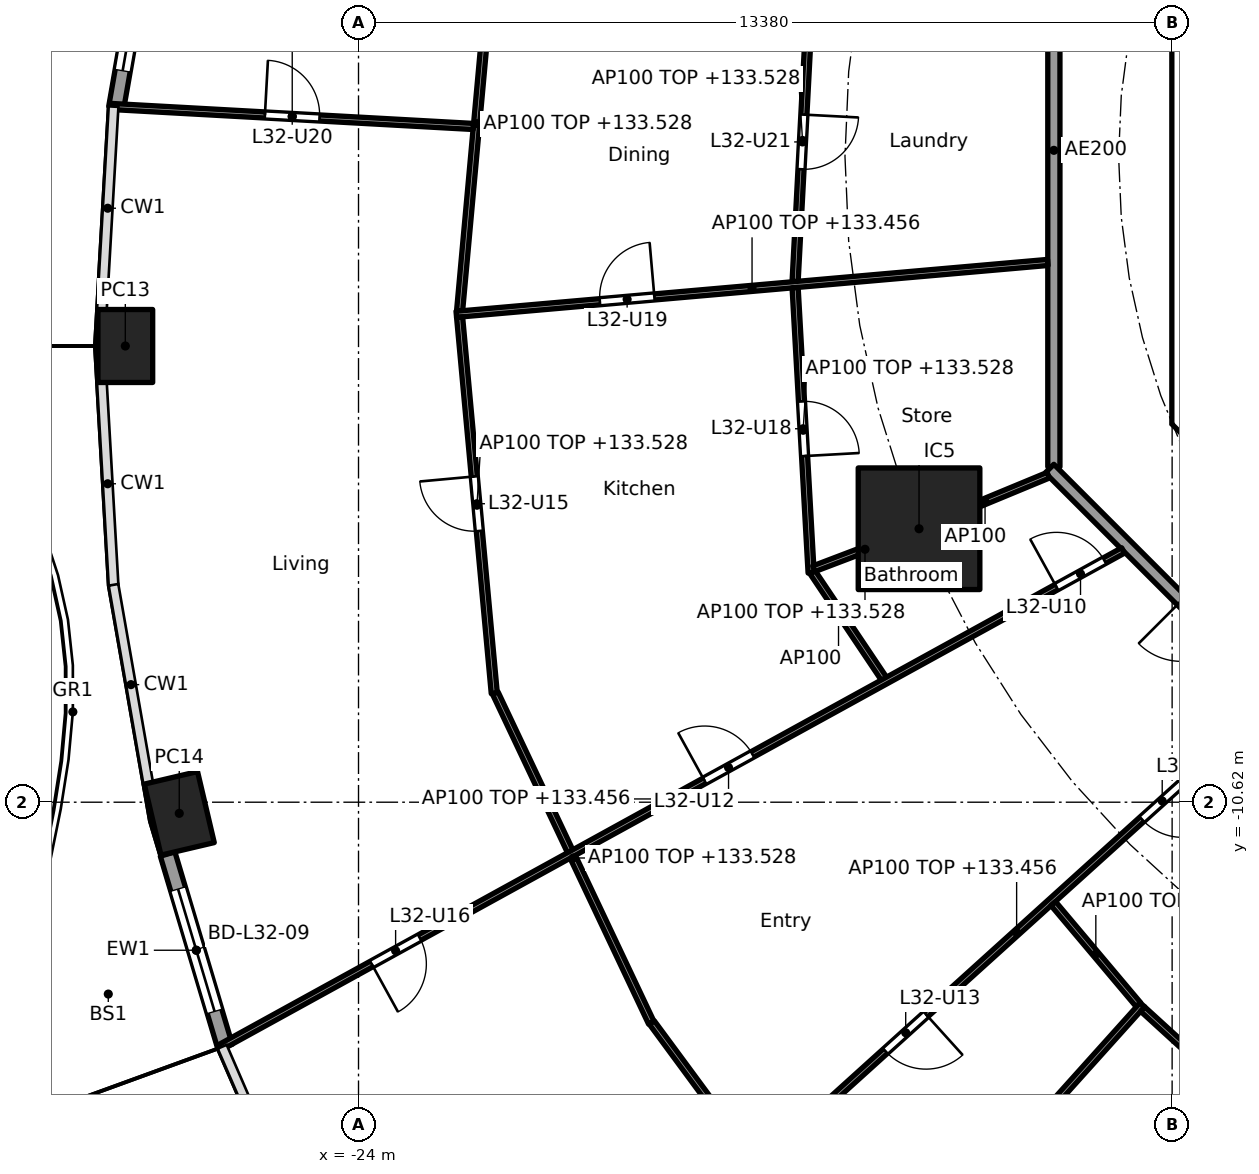
"""IFC4 building model, lengths in metres.
Left out: names, types, materials, properties, quantities, classifications, styles, units other than length and angle.
Written with IfcOpenShell. Run it as: python <this file> out.ifc"""

import sys

from ifc_helpers import new_model, si_unit, direction, frame, frame_2d, origin, origin_2d, place, context, subcontext, project, spatial, polyline, rectangle, hollow_rectangle, outline, extrude, element, fill, save


model = new_model("IFC4")
c1 = context("Model", 3, precision=1e-05, world=origin(), true_north=direction((0.0, 1.0)))
c2 = subcontext(c1, "Body", "Model", "MODEL_VIEW")
j1 = project(units=[si_unit("LENGTHUNIT", "METRE"), si_unit("PLANEANGLEUNIT", "RADIAN")], contexts=[c1])
p1 = place(None, origin())
s1 = spatial("IfcSite", under=j1, at=p1, CompositionType="ELEMENT")
p2 = place(p1, origin())
s2 = spatial("IfcBuilding", under=s1, at=p2, CompositionType="ELEMENT")
p3 = place(p2, frame((0.0, 0.0, 130.7)))
s3 = spatial("IfcBuildingStorey", under=s2, at=p3, CompositionType="ELEMENT", Elevation=130.7)
for number, where, z_axis, x_axis in (
    (1, (-27.835, -3.118, 0.0), (0.0, 0.0, 1.0), (0.0, -1.0, 0.0)),
    (2, (-26.948, -10.803, 0.0), (0.0, 0.0, 1.0), (0.229, -0.973, 0.0)),
):
    element("IfcColumn", number, at=place(p3, frame(where, z_axis=z_axis, x_axis=x_axis)), inside=s3, PredefinedType="COLUMN", context=c2, shape_type="SweptSolid", body=[
        extrude(hollow_rectangle(XDim=1.2, YDim=0.9, WallThickness=0.04, at=origin_2d()), origin(), (0.0, 0.0, 1.0), 3.7),
    ])
p4 = place(p3, frame((-14.782, -6.123, 0.0), z_axis=(0.0, 0.0, 1.0), x_axis=(1.0, 0.0, 0.0)))
e3 = element("IfcColumn", 3, at=p4, inside=s3, PredefinedType="COLUMN", context=c2, shape_type="SweptSolid", body=[
    extrude(rectangle(XDim=2.0, YDim=2.0, at=origin_2d()), origin(), (0.0, 0.0, 1.0), 3.7),
])
p5 = place(p3, frame((-27.985, 0.802, 0.0), z_axis=(0.0, 0.0, 1.0), x_axis=(0.172163521006, 0.985068384446, 0.0)))
e4 = element("IfcWall", 4, at=p5, inside=s3, PredefinedType="SOLIDWALL", context=c2, shape_type="SweptSolid", body=[
    extrude(rectangle(XDim=3.333, YDim=0.25, at=frame_2d((1.666, 0.0))), origin(), (0.0, 0.0, 1.0), 3.44),
])
p6 = place(p5, frame((0.616, 0.0, 0.0)))
e5 = element("IfcOpeningElement", 5, at=p6, cuts=e4, PredefinedType="OPENING", context=c2, shape_type="SweptSolid", body=[
    extrude(rectangle(XDim=2.1, YDim=2.4, at=frame_2d((1.05, 1.2))), frame((0.0, 0.135, 0.0), z_axis=(0.0, -1.0, 0.0), x_axis=(1.0, 0.0, 0.0)), (0.0, 0.0, 1.0), 0.27),
])
p7 = place(p3, frame((-26.195, -14.637, 0.0), z_axis=(0.0, 0.0, 1.0), x_axis=(-0.285889665412, 0.958262541901, 0.0)))
e6 = element("IfcWall", 6, at=p7, inside=s3, PredefinedType="SOLIDWALL", context=c2, shape_type="SweptSolid", body=[
    extrude(rectangle(XDim=3.303, YDim=0.25, at=frame_2d((1.652, 0.0))), origin(), (0.0, 0.0, 1.0), 3.44),
])
p8 = place(p7, frame((0.602, 0.0, 0.0)))
e7 = element("IfcOpeningElement", 7, at=p8, cuts=e6, PredefinedType="OPENING", context=c2, shape_type="SweptSolid", body=[
    extrude(rectangle(XDim=2.1, YDim=2.4, at=frame_2d((1.05, 1.2))), frame((0.0, 0.135, 0.0), z_axis=(0.0, -1.0, 0.0), x_axis=(1.0, 0.0, 0.0)), (0.0, 0.0, 1.0), 0.27),
])
p9 = place(p3, frame((-10.325, 3.801, 0.0), z_axis=(0.0, 0.0, 1.0), x_axis=(0.0, -1.0, 0.0)))
e8 = element("IfcWall", 8, at=p9, inside=s3, PredefinedType="SHEAR", context=c2, shape_type="SweptSolid", body=[
    extrude(rectangle(XDim=7.602, YDim=0.6, at=frame_2d((3.801, 0.0))), origin(), (0.0, 0.0, 1.0), 3.44),
])
p10 = place(p9, frame((0.651, 0.0, 0.0)))
e9 = element("IfcOpeningElement", 9, at=p10, cuts=e8, PredefinedType="OPENING", context=c2, shape_type="SweptSolid", body=[
    extrude(rectangle(XDim=1.5, YDim=2.1, at=frame_2d((0.75, 1.05))), frame((0.0, 0.31, 0.0), z_axis=(0.0, -1.0, 0.0), x_axis=(1.0, 0.0, 0.0)), (0.0, 0.0, 1.0), 0.62),
])
p11 = place(p9, frame((5.451, 0.0, 0.0)))
e10 = element("IfcOpeningElement", 10, at=p11, cuts=e8, PredefinedType="OPENING", context=c2, shape_type="SweptSolid", body=[
    extrude(rectangle(XDim=1.5, YDim=2.1, at=frame_2d((0.75, 1.05))), frame((0.0, 0.31, 0.0), z_axis=(0.0, -1.0, 0.0), x_axis=(1.0, 0.0, 0.0)), (0.0, 0.0, 1.0), 0.62),
])
p12 = place(p3, origin())
e11 = element("IfcWall", 11, at=p12, inside=s3, PredefinedType="SHEAR", context=c2, shape_type="SweptSolid", body=[
    extrude(outline(polyline([(-10.625, -3.801), (-10.025, -3.801), (-10.025, -4.152), (-9.776, -4.401), (-10.2, -4.825), (-10.625, -4.401), (-10.625, -3.801)])), origin(), (0.0, 0.0, 1.0), 3.44),
])
p13 = place(p3, frame((-6.149, -14.825, 0.0), z_axis=(0.0, 0.0, 1.0), x_axis=(-0.525406383516, -0.85085141603, 0.0)))
e12 = element("IfcWall", 12, at=p13, inside=s3, PredefinedType="PARTITIONING", context=c2, shape_type="SweptSolid", body=[
    extrude(rectangle(XDim=15.925, YDim=0.2, at=frame_2d((7.962, 0.0))), origin(), (0.0, 0.0, 1.0), 2.828),
])
p14 = place(p3, frame((-12.565, 5.304, 0.0), z_axis=(0.0, 0.0, 1.0), x_axis=(0.0, -1.0, 0.0)))
e13 = element("IfcWall", 13, at=p14, inside=s3, PredefinedType="PARTITIONING", context=c2, shape_type="SweptSolid", body=[
    extrude(rectangle(XDim=10.409, YDim=0.2, at=frame_2d((5.205, 0.0))), origin(), (0.0, 0.0, 1.0), 3.44),
])
p15 = place(p3, frame((-12.635, -5.134, 0.0), z_axis=(0.0, 0.0, 1.0), x_axis=(0.707106781187, -0.707106781187, 0.0)))
e14 = element("IfcWall", 14, at=p15, inside=s3, PredefinedType="PARTITIONING", context=c2, shape_type="SweptSolid", body=[
    extrude(rectangle(XDim=10.609, YDim=0.2, at=frame_2d((5.305, 0.0))), origin(), (0.0, 0.0, 1.0), 3.44),
])
p16 = place(p15, frame((3.07, 0.0, 0.0)))
e15 = element("IfcOpeningElement", 15, at=p16, cuts=e14, PredefinedType="OPENING", context=c2, shape_type="SweptSolid", body=[
    extrude(rectangle(XDim=1.0, YDim=2.1, at=frame_2d((0.5, 1.05))), frame((0.0, 0.11, 0.0), z_axis=(0.0, -1.0, 0.0), x_axis=(1.0, 0.0, 0.0)), (0.0, 0.0, 1.0), 0.22),
])
p17 = place(p3, frame((-16.576, 2.585, 0.0), z_axis=(0.0, 0.0, 1.0), x_axis=(-0.052509224895, -0.998620439056, 0.0)))
e16 = element("IfcWall", 16, at=p17, inside=s3, PredefinedType="PARTITIONING", context=c2, shape_type="SweptSolid", body=[
    extrude(rectangle(XDim=4.649, YDim=0.1, at=frame_2d((2.325, 0.0))), origin(), (0.0, 0.0, 1.0), 2.828),
])
p18 = place(p17, frame((1.9, 0.0, 0.0)))
e17 = element("IfcOpeningElement", 17, at=p18, cuts=e16, PredefinedType="OPENING", context=c2, shape_type="SweptSolid", body=[
    extrude(rectangle(XDim=0.9, YDim=2.1, at=frame_2d((0.45, 1.05))), frame((0.0, 0.06, 0.0), z_axis=(0.0, -1.0, 0.0), x_axis=(1.0, 0.0, 0.0)), (0.0, 0.0, 1.0), 0.12),
])
p19 = place(p3, frame((-21.777, 3.621, 0.0), z_axis=(0.0, 0.0, 1.0), x_axis=(-0.090606877484, -0.995886737412, 0.0)))
e18 = element("IfcWall", 18, at=p19, inside=s3, PredefinedType="PARTITIONING", context=c2, shape_type="SweptSolid", body=[
    extrude(rectangle(XDim=6.189, YDim=0.1, at=frame_2d((3.095, 0.0))), origin(), (0.0, 0.0, 1.0), 2.828),
])
p20 = place(p3, frame((-22.112, 0.492, 0.0), z_axis=(0.0, 0.0, 1.0), x_axis=(-0.998479185151, 0.055129999278, 0.0)))
e19 = element("IfcWall", 19, at=p20, inside=s3, PredefinedType="PARTITIONING", context=c2, shape_type="SweptSolid", body=[
    extrude(rectangle(XDim=5.965, YDim=0.1, at=frame_2d((2.982, 0.0))), origin(), (0.0, 0.0, 1.0), 2.905),
])
p21 = place(p20, frame((2.533, 0.0, 0.0)))
e20 = element("IfcOpeningElement", 20, at=p21, cuts=e19, PredefinedType="OPENING", context=c2, shape_type="SweptSolid", body=[
    extrude(rectangle(XDim=0.9, YDim=2.1, at=frame_2d((0.45, 1.05))), frame((0.0, 0.06, 0.0), z_axis=(0.0, -1.0, 0.0), x_axis=(1.0, 0.0, 0.0)), (0.0, 0.0, 1.0), 0.12),
])
p22 = place(p3, frame((-12.664, -1.744, 0.0), z_axis=(0.0, 0.0, 1.0), x_axis=(-0.99617728169, -0.087354584571, 0.0)))
e21 = element("IfcWall", 21, at=p22, inside=s3, PredefinedType="PARTITIONING", context=c2, shape_type="SweptSolid", body=[
    extrude(rectangle(XDim=9.765, YDim=0.1, at=frame_2d((4.883, 0.0))), origin(), (0.0, 0.0, 1.0), 2.756),
])
p23 = place(p22, frame((6.495, 0.0, 0.0)))
e22 = element("IfcOpeningElement", 22, at=p23, cuts=e21, PredefinedType="OPENING", context=c2, shape_type="SweptSolid", body=[
    extrude(rectangle(XDim=0.9, YDim=2.1, at=frame_2d((0.45, 1.05))), frame((0.0, 0.06, 0.0), z_axis=(0.0, -1.0, 0.0), x_axis=(1.0, 0.0, 0.0)), (0.0, 0.0, 1.0), 0.12),
])
p24 = place(p3, frame((-16.82, -2.158, 0.0), z_axis=(0.0, 0.0, 1.0), x_axis=(0.055967931845, -0.998432566879, 0.0)))
e23 = element("IfcWall", 23, at=p24, inside=s3, PredefinedType="PARTITIONING", context=c2, shape_type="SweptSolid", body=[
    extrude(rectangle(XDim=4.698, YDim=0.1, at=frame_2d((2.349, 0.0))), origin(), (0.0, 0.0, 1.0), 2.828),
])
p25 = place(p24, frame((1.874, 0.0, 0.0)))
e24 = element("IfcOpeningElement", 24, at=p25, cuts=e23, PredefinedType="OPENING", context=c2, shape_type="SweptSolid", body=[
    extrude(rectangle(XDim=0.9, YDim=2.1, at=frame_2d((0.45, 1.05))), frame((0.0, 0.06, 0.0), z_axis=(0.0, -1.0, 0.0), x_axis=(1.0, 0.0, 0.0)), (0.0, 0.0, 1.0), 0.12),
])
p26 = place(p3, frame((-22.338, -2.642, 0.0), z_axis=(0.0, 0.0, 1.0), x_axis=(0.091768304523, -0.995780386574, 0.0)))
e25 = element("IfcWall", 25, at=p26, inside=s3, PredefinedType="PARTITIONING", context=c2, shape_type="SweptSolid", body=[
    extrude(rectangle(XDim=6.215, YDim=0.1, at=frame_2d((3.107, 0.0))), origin(), (0.0, 0.0, 1.0), 2.828),
])
p27 = place(p26, frame((2.632, 0.0, 0.0)))
e26 = element("IfcOpeningElement", 26, at=p27, cuts=e25, PredefinedType="OPENING", context=c2, shape_type="SweptSolid", body=[
    extrude(rectangle(XDim=0.9, YDim=2.1, at=frame_2d((0.45, 1.05))), frame((0.0, 0.06, 0.0), z_axis=(0.0, -1.0, 0.0), x_axis=(1.0, 0.0, 0.0)), (0.0, 0.0, 1.0), 0.12),
])
p28 = place(p3, frame((-12.657, -5.243, 0.0), z_axis=(0.0, 0.0, 1.0), x_axis=(-0.923864733477, -0.382719158442, 0.0)))
e27 = element("IfcWall", 27, at=p28, inside=s3, PredefinedType="PARTITIONING", context=c2, shape_type="SweptSolid", body=[
    extrude(rectangle(XDim=2.25, YDim=0.1, at=frame_2d((1.125, 0.0))), origin(), (0.0, 0.0, 1.0), 3.44),
])
p29 = place(p3, frame((-14.829, -6.141, 0.0), z_axis=(0.0, 0.0, 1.0), x_axis=(-0.934704367514, -0.355426146128, 0.0)))
e28 = element("IfcWall", 28, at=p29, inside=s3, PredefinedType="PARTITIONING", context=c2, shape_type="SweptSolid", body=[
    extrude(rectangle(XDim=1.802, YDim=0.1, at=frame_2d((0.901, 0.0))), origin(), (0.0, 0.0, 1.0), 2.828),
])
p30 = place(p3, frame((-16.532, -6.84, 0.0), z_axis=(0.0, 0.0, 1.0), x_axis=(0.556994773624, -0.830515997531, 0.0)))
e29 = element("IfcWall", 29, at=p30, inside=s3, PredefinedType="PARTITIONING", context=c2, shape_type="SweptSolid", body=[
    extrude(rectangle(XDim=2.183, YDim=0.1, at=frame_2d((1.092, 0.0))), origin(), (0.0, 0.0, 1.0), 3.44),
])
p31 = place(p3, frame((-21.75, -8.826, 0.0), z_axis=(0.0, 0.0, 1.0), x_axis=(0.427736419988, -0.903903509793, 0.0)))
e30 = element("IfcWall", 30, at=p31, inside=s3, PredefinedType="PARTITIONING", context=c2, shape_type="SweptSolid", body=[
    extrude(rectangle(XDim=5.999, YDim=0.1, at=frame_2d((3.0, 0.0))), origin(), (0.0, 0.0, 1.0), 2.828),
])
p32 = place(p3, frame((-11.426, -6.479, 0.0), z_axis=(0.0, 0.0, 1.0), x_axis=(-0.876110392495, -0.482110547657, 0.0)))
e31 = element("IfcWall", 31, at=p32, inside=s3, PredefinedType="PARTITIONING", context=c2, shape_type="SweptSolid", body=[
    extrude(rectangle(XDim=16.955, YDim=0.1, at=frame_2d((8.478, 0.0))), origin(), (0.0, 0.0, 1.0), 2.756),
])
p33 = place(p32, frame((0.35, 0.0, 0.0)))
e32 = element("IfcOpeningElement", 32, at=p33, cuts=e31, PredefinedType="OPENING", context=c2, shape_type="SweptSolid", body=[
    extrude(rectangle(XDim=0.9, YDim=2.1, at=frame_2d((0.45, 1.05))), frame((0.0, 0.06, 0.0), z_axis=(0.0, -1.0, 0.0), x_axis=(1.0, 0.0, 0.0)), (0.0, 0.0, 1.0), 0.12),
])
p34 = place(p32, frame((6.957, 0.0, 0.0)))
e33 = element("IfcOpeningElement", 33, at=p34, cuts=e31, PredefinedType="OPENING", context=c2, shape_type="SweptSolid", body=[
    extrude(rectangle(XDim=0.9, YDim=2.1, at=frame_2d((0.45, 1.05))), frame((0.0, 0.06, 0.0), z_axis=(0.0, -1.0, 0.0), x_axis=(1.0, 0.0, 0.0)), (0.0, 0.0, 1.0), 0.12),
])
p35 = place(p32, frame((13.206, 0.0, 0.0)))
e34 = element("IfcOpeningElement", 34, at=p35, cuts=e31, PredefinedType="OPENING", context=c2, shape_type="SweptSolid", body=[
    extrude(rectangle(XDim=0.9, YDim=2.1, at=frame_2d((0.45, 1.05))), frame((0.0, 0.06, 0.0), z_axis=(0.0, -1.0, 0.0), x_axis=(1.0, 0.0, 0.0)), (0.0, 0.0, 1.0), 0.12),
])
p36 = place(p3, frame((-19.176, -14.244, 0.0), z_axis=(0.0, 0.0, 1.0), x_axis=(0.593532053206, -0.80481035146, 0.0)))
e35 = element("IfcWall", 35, at=p36, inside=s3, PredefinedType="PARTITIONING", context=c2, shape_type="SweptSolid", body=[
    extrude(rectangle(XDim=5.876, YDim=0.1, at=frame_2d((2.938, 0.0))), origin(), (0.0, 0.0, 1.0), 2.828),
])
p37 = place(p3, frame((-8.959, -8.952, 0.0), z_axis=(0.0, 0.0, 1.0), x_axis=(-0.741982736283, -0.670418987692, 0.0)))
e36 = element("IfcWall", 36, at=p37, inside=s3, PredefinedType="PARTITIONING", context=c2, shape_type="SweptSolid", body=[
    extrude(rectangle(XDim=11.371, YDim=0.1, at=frame_2d((5.685, 0.0))), origin(), (0.0, 0.0, 1.0), 2.756),
])
p38 = place(p37, frame((2.009, 0.0, 0.0)))
e37 = element("IfcOpeningElement", 37, at=p38, cuts=e36, PredefinedType="OPENING", context=c2, shape_type="SweptSolid", body=[
    extrude(rectangle(XDim=0.9, YDim=2.1, at=frame_2d((0.45, 1.05))), frame((0.0, 0.06, 0.0), z_axis=(0.0, -1.0, 0.0), x_axis=(1.0, 0.0, 0.0)), (0.0, 0.0, 1.0), 0.12),
])
p39 = place(p37, frame((7.694, 0.0, 0.0)))
e38 = element("IfcOpeningElement", 38, at=p39, cuts=e36, PredefinedType="OPENING", context=c2, shape_type="SweptSolid", body=[
    extrude(rectangle(XDim=0.9, YDim=2.1, at=frame_2d((0.45, 1.05))), frame((0.0, 0.06, 0.0), z_axis=(0.0, -1.0, 0.0), x_axis=(1.0, 0.0, 0.0)), (0.0, 0.0, 1.0), 0.12),
])
p40 = place(p3, frame((-12.575, -12.286, 0.0), z_axis=(0.0, 0.0, 1.0), x_axis=(0.644052758448, -0.764981074495, 0.0)))
e39 = element("IfcWall", 39, at=p40, inside=s3, PredefinedType="PARTITIONING", context=c2, shape_type="SweptSolid", body=[
    extrude(rectangle(XDim=2.174, YDim=0.1, at=frame_2d((1.087, 0.0))), origin(), (0.0, 0.0, 1.0), 2.828),
])
p41 = place(p3, frame((-11.109, -13.951, 0.0), z_axis=(0.0, 0.0, 1.0), x_axis=(-0.668488676691, -0.743722319913, 0.0)))
e40 = element("IfcWall", 40, at=p41, inside=s3, PredefinedType="PARTITIONING", context=c2, shape_type="SweptSolid", body=[
    extrude(rectangle(XDim=13.094, YDim=0.1, at=frame_2d((6.547, 0.0))), origin(), (0.0, 0.0, 1.0), 2.828),
])
p42 = place(p41, frame((9.5, 0.0, 0.0)))
e41 = element("IfcOpeningElement", 41, at=p42, cuts=e40, PredefinedType="OPENING", context=c2, shape_type="SweptSolid", body=[
    extrude(rectangle(XDim=0.9, YDim=2.1, at=frame_2d((0.45, 1.05))), frame((0.0, 0.06, 0.0), z_axis=(0.0, -1.0, 0.0), x_axis=(1.0, 0.0, 0.0)), (0.0, 0.0, 1.0), 0.12),
])
p43 = place(p3, frame((-11.105, -14.021, 0.0), z_axis=(0.0, 0.0, 1.0), x_axis=(0.738880014758, -0.673837015747, 0.0)))
e42 = element("IfcWall", 42, at=p43, inside=s3, PredefinedType="PARTITIONING", context=c2, shape_type="SweptSolid", body=[
    extrude(rectangle(XDim=4.621, YDim=0.1, at=frame_2d((2.31, 0.0))), origin(), (0.0, 0.0, 1.0), 2.828),
])
p44 = place(p43, frame((1.558, 0.0, 0.0)))
e43 = element("IfcOpeningElement", 43, at=p44, cuts=e42, PredefinedType="OPENING", context=c2, shape_type="SweptSolid", body=[
    extrude(rectangle(XDim=0.9, YDim=2.1, at=frame_2d((0.45, 1.05))), frame((0.0, 0.06, 0.0), z_axis=(0.0, -1.0, 0.0), x_axis=(1.0, 0.0, 0.0)), (0.0, 0.0, 1.0), 0.12),
])
p45 = place(p6, origin())
e44 = element("IfcDoor", 44, at=p45, inside=s3, OperationType="SLIDING_TO_LEFT", PredefinedType="DOOR", context=c2, shape_type="SweptSolid", body=[
    extrude(rectangle(XDim=2.1, YDim=2.4, at=frame_2d((1.05, 1.2))), frame((0.0, 0.025, 0.0), z_axis=(0.0, -1.0, 0.0), x_axis=(1.0, 0.0, 0.0)), (0.0, 0.0, 1.0), 0.05),
])
fill(e5, e44)
p46 = place(p8, origin())
e45 = element("IfcDoor", 45, at=p46, inside=s3, OperationType="SLIDING_TO_LEFT", PredefinedType="DOOR", context=c2, shape_type="SweptSolid", body=[
    extrude(rectangle(XDim=2.1, YDim=2.4, at=frame_2d((1.05, 1.2))), frame((0.0, 0.025, 0.0), z_axis=(0.0, -1.0, 0.0), x_axis=(1.0, 0.0, 0.0)), (0.0, 0.0, 1.0), 0.05),
])
fill(e7, e45)
p47 = place(p33, frame((0.9, 0.0, 0.0), x_axis=(-1.0, 0.0, 0.0)))
e46 = element("IfcDoor", 46, at=p47, inside=s3, OperationType="SINGLE_SWING_LEFT", PredefinedType="DOOR", context=c2, shape_type="SweptSolid", body=[
    extrude(rectangle(XDim=0.9, YDim=2.1, at=frame_2d((0.45, 1.05))), frame((0.0, 0.025, 0.0), z_axis=(0.0, -1.0, 0.0), x_axis=(1.0, 0.0, 0.0)), (0.0, 0.0, 1.0), 0.05),
])
fill(e32, e46)
p48 = place(p38, origin())
e47 = element("IfcDoor", 47, at=p48, inside=s3, OperationType="SINGLE_SWING_LEFT", PredefinedType="DOOR", context=c2, shape_type="SweptSolid", body=[
    extrude(rectangle(XDim=0.9, YDim=2.1, at=frame_2d((0.45, 1.05))), frame((0.0, 0.025, 0.0), z_axis=(0.0, -1.0, 0.0), x_axis=(1.0, 0.0, 0.0)), (0.0, 0.0, 1.0), 0.05),
])
fill(e37, e47)
p49 = place(p34, frame((0.9, 0.0, 0.0), x_axis=(-1.0, 0.0, 0.0)))
e48 = element("IfcDoor", 48, at=p49, inside=s3, OperationType="SINGLE_SWING_LEFT", PredefinedType="DOOR", context=c2, shape_type="SweptSolid", body=[
    extrude(rectangle(XDim=0.9, YDim=2.1, at=frame_2d((0.45, 1.05))), frame((0.0, 0.025, 0.0), z_axis=(0.0, -1.0, 0.0), x_axis=(1.0, 0.0, 0.0)), (0.0, 0.0, 1.0), 0.05),
])
fill(e33, e48)
p50 = place(p39, origin())
e49 = element("IfcDoor", 49, at=p50, inside=s3, OperationType="SINGLE_SWING_LEFT", PredefinedType="DOOR", context=c2, shape_type="SweptSolid", body=[
    extrude(rectangle(XDim=0.9, YDim=2.1, at=frame_2d((0.45, 1.05))), frame((0.0, 0.025, 0.0), z_axis=(0.0, -1.0, 0.0), x_axis=(1.0, 0.0, 0.0)), (0.0, 0.0, 1.0), 0.05),
])
fill(e38, e49)
p51 = place(p27, frame((0.9, 0.0, 0.0), x_axis=(-1.0, 0.0, 0.0)))
e50 = element("IfcDoor", 50, at=p51, inside=s3, OperationType="SINGLE_SWING_RIGHT", PredefinedType="DOOR", context=c2, shape_type="SweptSolid", body=[
    extrude(rectangle(XDim=0.9, YDim=2.1, at=frame_2d((0.45, 1.05))), frame((0.0, 0.025, 0.0), z_axis=(0.0, -1.0, 0.0), x_axis=(1.0, 0.0, 0.0)), (0.0, 0.0, 1.0), 0.05),
])
fill(e26, e50)
p52 = place(p35, origin())
e51 = element("IfcDoor", 51, at=p52, inside=s3, OperationType="SINGLE_SWING_RIGHT", PredefinedType="DOOR", context=c2, shape_type="SweptSolid", body=[
    extrude(rectangle(XDim=0.9, YDim=2.1, at=frame_2d((0.45, 1.05))), frame((0.0, 0.025, 0.0), z_axis=(0.0, -1.0, 0.0), x_axis=(1.0, 0.0, 0.0)), (0.0, 0.0, 1.0), 0.05),
])
fill(e34, e51)
p53 = place(p25, origin())
e52 = element("IfcDoor", 52, at=p53, inside=s3, OperationType="SINGLE_SWING_RIGHT", PredefinedType="DOOR", context=c2, shape_type="SweptSolid", body=[
    extrude(rectangle(XDim=0.9, YDim=2.1, at=frame_2d((0.45, 1.05))), frame((0.0, 0.025, 0.0), z_axis=(0.0, -1.0, 0.0), x_axis=(1.0, 0.0, 0.0)), (0.0, 0.0, 1.0), 0.05),
])
fill(e24, e52)
p54 = place(p23, frame((0.9, 0.0, 0.0), x_axis=(-1.0, 0.0, 0.0)))
e53 = element("IfcDoor", 53, at=p54, inside=s3, OperationType="SINGLE_SWING_RIGHT", PredefinedType="DOOR", context=c2, shape_type="SweptSolid", body=[
    extrude(rectangle(XDim=0.9, YDim=2.1, at=frame_2d((0.45, 1.05))), frame((0.0, 0.025, 0.0), z_axis=(0.0, -1.0, 0.0), x_axis=(1.0, 0.0, 0.0)), (0.0, 0.0, 1.0), 0.05),
])
fill(e22, e53)
p55 = place(p21, frame((0.9, 0.0, 0.0), x_axis=(-1.0, 0.0, 0.0)))
e54 = element("IfcDoor", 54, at=p55, inside=s3, OperationType="SINGLE_SWING_LEFT", PredefinedType="DOOR", context=c2, shape_type="SweptSolid", body=[
    extrude(rectangle(XDim=0.9, YDim=2.1, at=frame_2d((0.45, 1.05))), frame((0.0, 0.025, 0.0), z_axis=(0.0, -1.0, 0.0), x_axis=(1.0, 0.0, 0.0)), (0.0, 0.0, 1.0), 0.05),
])
fill(e20, e54)
p56 = place(p18, origin())
e55 = element("IfcDoor", 55, at=p56, inside=s3, OperationType="SINGLE_SWING_LEFT", PredefinedType="DOOR", context=c2, shape_type="SweptSolid", body=[
    extrude(rectangle(XDim=0.9, YDim=2.1, at=frame_2d((0.45, 1.05))), frame((0.0, 0.025, 0.0), z_axis=(0.0, -1.0, 0.0), x_axis=(1.0, 0.0, 0.0)), (0.0, 0.0, 1.0), 0.05),
])
fill(e17, e55)
save(model, sys.argv[1])
